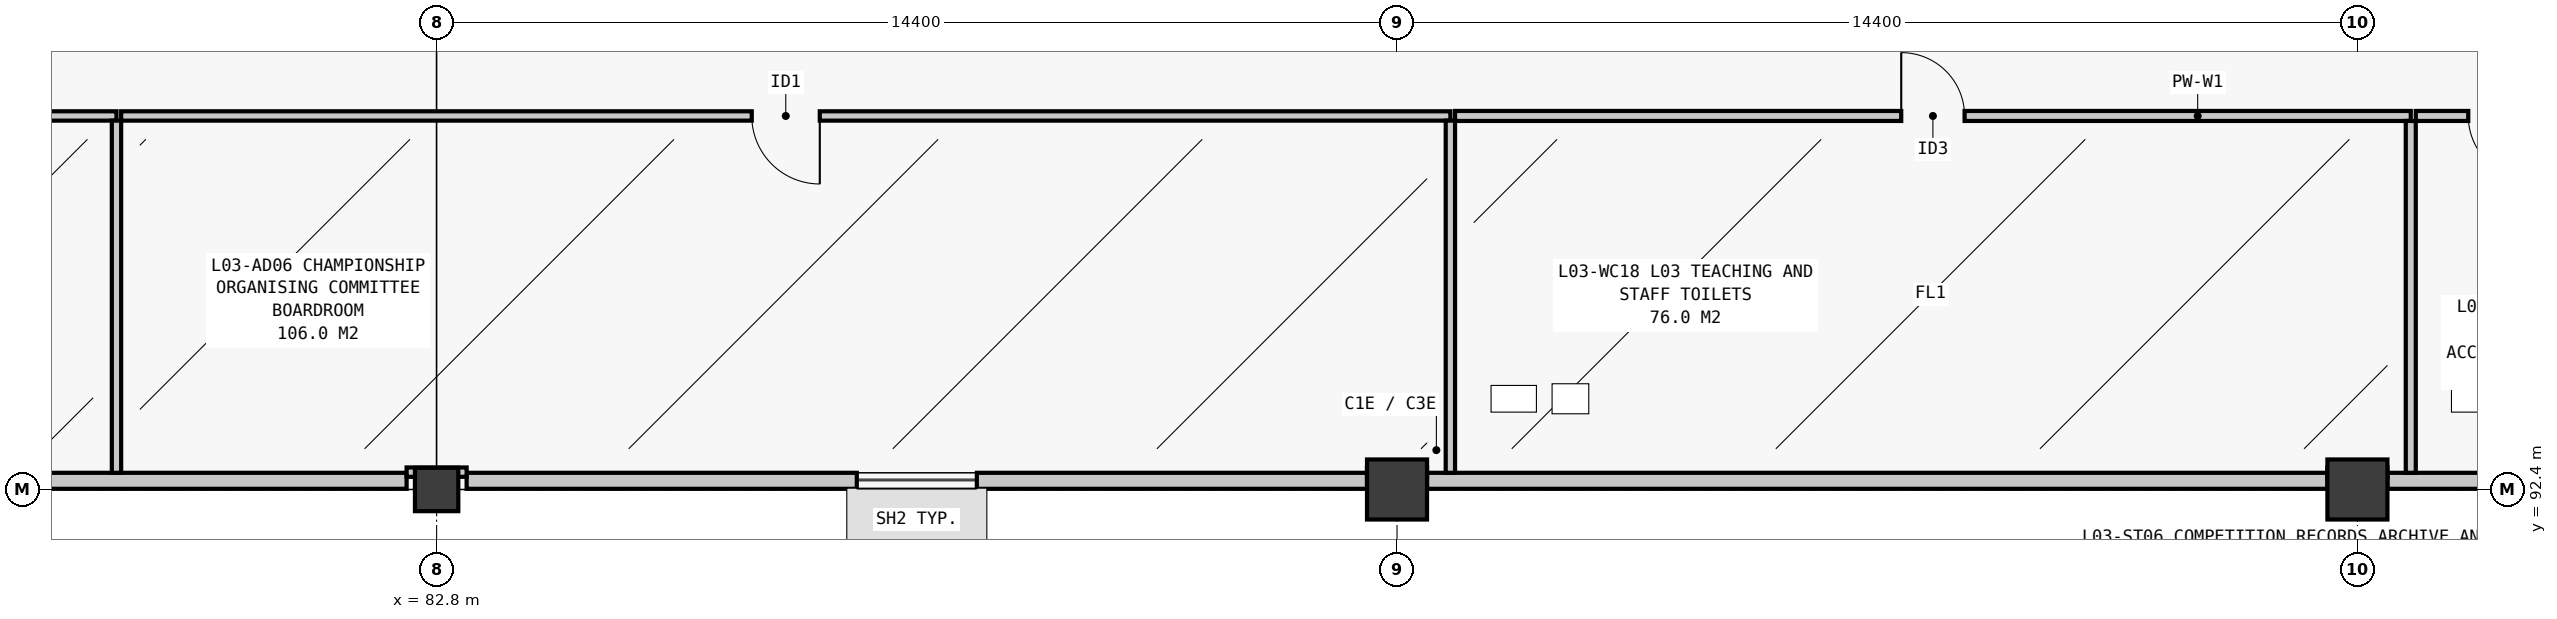
"""IFC4 building model, lengths in metres.
Left out: names, types, materials, properties, quantities, classifications, styles, units other than length and angle.
Written with IfcOpenShell. Run it as: python <this file> out.ifc"""

import sys

from ifc_helpers import new_model, si_unit, direction, frame, frame_2d, origin, origin_2d, place, context, subcontext, project, spatial, rectangle, extrude, element, fill, save


model = new_model("IFC4")
c1 = context("Model", 3, precision=1e-05, world=origin(), true_north=direction((0.0, 1.0)))
c2 = subcontext(c1, "Body", "Model", "MODEL_VIEW")
j1 = project(units=[si_unit("LENGTHUNIT", "METRE"), si_unit("PLANEANGLEUNIT", "RADIAN")], contexts=[c1])
p1 = place(None, origin())
s1 = spatial("IfcSite", under=j1, at=p1, CompositionType="ELEMENT")
p2 = place(p1, origin())
s2 = spatial("IfcBuilding", under=s1, at=p2, CompositionType="ELEMENT")
p3 = place(p2, frame((0.0, 0.0, 13.2)))
s3 = spatial("IfcBuildingStorey", under=s2, at=p3, CompositionType="ELEMENT", Elevation=13.2)
p4 = place(p3, frame((82.8, 92.4, 0.203), z_axis=(0.0, 0.0, 1.0), x_axis=(1.0, 0.0, 0.0)))
e1 = element("IfcColumn", 1, at=p4, inside=s3, PredefinedType="COLUMN", context=c2, shape_type="SweptSolid", body=[
    extrude(rectangle(XDim=0.65, YDim=0.65, at=origin_2d()), origin(), (0.0, 0.0, 1.0), 3.997),
])
p5 = place(p3, frame((97.2, 92.4, 0.0), z_axis=(0.0, 0.0, 1.0), x_axis=(1.0, 0.0, 0.0)))
e2 = element("IfcColumn", 2, at=p5, inside=s3, PredefinedType="COLUMN", context=c2, shape_type="SweptSolid", body=[
    extrude(rectangle(XDim=0.9, YDim=0.9, at=origin_2d()), origin(), (0.0, 0.0, 1.0), 0.994),
])
p6 = place(p3, frame((97.2, 92.4, 0.994), z_axis=(0.0, 0.0, 1.0), x_axis=(1.0, 0.0, 0.0)))
e3 = element("IfcColumn", 3, at=p6, inside=s3, PredefinedType="COLUMN", context=c2, shape_type="SweptSolid", body=[
    extrude(rectangle(XDim=0.65, YDim=0.65, at=origin_2d()), origin(), (0.0, 0.0, 1.0), 3.206),
])
p7 = place(p3, frame((111.6, 92.4, 0.0), z_axis=(0.0, 0.0, 1.0), x_axis=(1.0, 0.0, 0.0)))
e4 = element("IfcColumn", 4, at=p7, inside=s3, PredefinedType="COLUMN", context=c2, shape_type="SweptSolid", body=[
    extrude(rectangle(XDim=0.9, YDim=0.9, at=origin_2d()), origin(), (0.0, 0.0, 1.0), 2.829),
])
p8 = place(p3, frame((111.6, 92.4, 2.829), z_axis=(0.0, 0.0, 1.0), x_axis=(1.0, 0.0, 0.0)))
e5 = element("IfcColumn", 5, at=p8, inside=s3, PredefinedType="COLUMN", context=c2, shape_type="SweptSolid", body=[
    extrude(rectangle(XDim=0.65, YDim=0.65, at=origin_2d()), origin(), (0.0, 0.0, 1.0), 1.371),
])
p9 = place(p3, frame((68.85, 92.53, 0.0), z_axis=(0.0, 0.0, 1.0), x_axis=(1.0, 0.0, 0.0)))
e6 = element("IfcWall", 6, at=p9, inside=s3, PredefinedType="STANDARD", context=c2, shape_type="SweptSolid", body=[
    extrude(rectangle(XDim=13.5, YDim=0.24, at=frame_2d((6.75, 0.0))), origin(), (0.0, 0.0, 1.0), 3.204),
])
p10 = place(p9, frame((5.85, 0.0, 1.35)))
e7 = element("IfcOpeningElement", 7, at=p10, cuts=e6, PredefinedType="OPENING", context=c2, shape_type="SweptSolid", body=[
    extrude(rectangle(XDim=1.8, YDim=1.2, at=frame_2d((0.9, 0.6))), frame((0.0, 0.135, 0.0), z_axis=(0.0, -1.0, 0.0), x_axis=(1.0, 0.0, 0.0)), (0.0, 0.0, 1.0), 0.27),
])
p11 = place(p3, frame((83.25, 92.53, 0.0), z_axis=(0.0, 0.0, 1.0), x_axis=(1.0, 0.0, 0.0)))
e8 = element("IfcWall", 8, at=p11, inside=s3, PredefinedType="STANDARD", context=c2, shape_type="SweptSolid", body=[
    extrude(rectangle(XDim=13.5, YDim=0.24, at=frame_2d((6.75, 0.0))), origin(), (0.0, 0.0, 1.0), 3.204),
])
p12 = place(p11, frame((5.85, 0.0, 1.35)))
e9 = element("IfcOpeningElement", 9, at=p12, cuts=e8, PredefinedType="OPENING", context=c2, shape_type="SweptSolid", body=[
    extrude(rectangle(XDim=1.8, YDim=1.2, at=frame_2d((0.9, 0.6))), frame((0.0, 0.135, 0.0), z_axis=(0.0, -1.0, 0.0), x_axis=(1.0, 0.0, 0.0)), (0.0, 0.0, 1.0), 0.27),
])
p13 = place(p3, frame((97.65, 92.53, 0.0), z_axis=(0.0, 0.0, 1.0), x_axis=(1.0, 0.0, 0.0)))
e10 = element("IfcWall", 10, at=p13, inside=s3, PredefinedType="STANDARD", context=c2, shape_type="SweptSolid", body=[
    extrude(rectangle(XDim=13.5, YDim=0.24, at=frame_2d((6.75, 0.0))), origin(), (0.0, 0.0, 1.0), 3.204),
])
p14 = place(p3, frame((112.05, 92.53, 0.0), z_axis=(0.0, 0.0, 1.0), x_axis=(1.0, 0.0, 0.0)))
e11 = element("IfcWall", 11, at=p14, inside=s3, PredefinedType="STANDARD", context=c2, shape_type="SweptSolid", body=[
    extrude(rectangle(XDim=13.5, YDim=0.24, at=frame_2d((6.75, 0.0))), origin(), (0.0, 0.0, 1.0), 1.79),
])
p15 = place(p3, frame((54.12, 98.0, 0.0), z_axis=(0.0, 0.0, 1.0), x_axis=(1.0, 0.0, 0.0)))
e12 = element("IfcWall", 12, at=p15, inside=s3, PredefinedType="PARTITIONING", context=c2, shape_type="SweptSolid", body=[
    extrude(rectangle(XDim=23.88, YDim=0.14, at=frame_2d((11.94, 0.0))), origin(), (0.0, 0.0, 1.0), 3.97),
])
p16 = place(p15, frame((11.465, 0.0, 0.0)))
e13 = element("IfcOpeningElement", 13, at=p16, cuts=e12, PredefinedType="OPENING", context=c2, shape_type="SweptSolid", body=[
    extrude(rectangle(XDim=0.95, YDim=2.15, at=frame_2d((0.475, 1.075))), frame((0.0, 0.085, 0.0), z_axis=(0.0, -1.0, 0.0), x_axis=(1.0, 0.0, 0.0)), (0.0, 0.0, 1.0), 0.17),
])
p17 = place(p3, frame((78.0, 92.65, 0.0), z_axis=(0.0, 0.0, 1.0), x_axis=(0.0, 1.0, 0.0)))
e14 = element("IfcWall", 14, at=p17, inside=s3, PredefinedType="PARTITIONING", context=c2, shape_type="SweptSolid", body=[
    extrude(rectangle(XDim=5.28, YDim=0.14, at=frame_2d((2.64, 0.0))), origin(), (0.0, 0.0, 1.0), 3.97),
])
p18 = place(p3, frame((78.07, 98.0, 0.0), z_axis=(0.0, 0.0, 1.0), x_axis=(1.0, 0.0, 0.0)))
e15 = element("IfcWall", 15, at=p18, inside=s3, PredefinedType="PARTITIONING", context=c2, shape_type="SweptSolid", body=[
    extrude(rectangle(XDim=19.93, YDim=0.14, at=frame_2d((9.965, 0.0))), origin(), (0.0, 0.0, 1.0), 3.97),
])
p19 = place(p18, frame((9.455, 0.0, 0.0)))
e16 = element("IfcOpeningElement", 16, at=p19, cuts=e15, PredefinedType="OPENING", context=c2, shape_type="SweptSolid", body=[
    extrude(rectangle(XDim=1.02, YDim=2.15, at=frame_2d((0.51, 1.075))), frame((0.0, 0.085, 0.0), z_axis=(0.0, -1.0, 0.0), x_axis=(1.0, 0.0, 0.0)), (0.0, 0.0, 1.0), 0.17),
])
for number, where, z_axis, x_axis in (
    (17, (82.35, 92.66, 0.0), (0.0, 0.0, 1.0), (1.0, 0.0, 0.0)),
    (18, (96.75, 92.66, 0.0), (0.0, 0.0, 1.0), (1.0, 0.0, 0.0)),
):
    element("IfcWall", number, at=place(p3, frame(where, z_axis=z_axis, x_axis=x_axis)), inside=s3, PredefinedType="PARTITIONING", context=c2, shape_type="SweptSolid", body=[
        extrude(rectangle(XDim=0.9, YDim=0.14, at=frame_2d((0.45, 0.0))), origin(), (0.0, 0.0, 1.0), 3.97),
    ])
p20 = place(p3, frame((98.0, 92.65, 0.0), z_axis=(0.0, 0.0, 1.0), x_axis=(0.0, 1.0, 0.0)))
e19 = element("IfcWall", 19, at=p20, inside=s3, PredefinedType="PARTITIONING", context=c2, shape_type="SweptSolid", body=[
    extrude(rectangle(XDim=5.28, YDim=0.14, at=frame_2d((2.64, 0.0))), origin(), (0.0, 0.0, 1.0), 3.97),
])
p21 = place(p3, frame((98.07, 98.0, 0.0), z_axis=(0.0, 0.0, 1.0), x_axis=(1.0, 0.0, 0.0)))
e20 = element("IfcWall", 20, at=p21, inside=s3, PredefinedType="PLUMBINGWALL", context=c2, shape_type="SweptSolid", body=[
    extrude(rectangle(XDim=14.33, YDim=0.15, at=frame_2d((7.165, 0.0))), origin(), (0.0, 0.0, 1.0), 3.97),
])
p22 = place(p21, frame((6.69, 0.0, 0.0)))
e21 = element("IfcOpeningElement", 21, at=p22, cuts=e20, PredefinedType="OPENING", context=c2, shape_type="SweptSolid", body=[
    extrude(rectangle(XDim=0.95, YDim=2.1, at=frame_2d((0.475, 1.05))), frame((0.0, 0.09, 0.0), z_axis=(0.0, -1.0, 0.0), x_axis=(1.0, 0.0, 0.0)), (0.0, 0.0, 1.0), 0.18),
])
p23 = place(p3, frame((111.15, 92.66, 0.0), z_axis=(0.0, 0.0, 1.0), x_axis=(1.0, 0.0, 0.0)))
e22 = element("IfcWall", 22, at=p23, inside=s3, PredefinedType="PLUMBINGWALL", context=c2, shape_type="SweptSolid", body=[
    extrude(rectangle(XDim=0.9, YDim=0.15, at=frame_2d((0.45, 0.0))), origin(), (0.0, 0.0, 1.0), 3.97),
])
p24 = place(p3, frame((112.4, 92.65, 0.0), z_axis=(0.0, 0.0, 1.0), x_axis=(0.0, 1.0, 0.0)))
e23 = element("IfcWall", 23, at=p24, inside=s3, PredefinedType="PLUMBINGWALL", context=c2, shape_type="SweptSolid", body=[
    extrude(rectangle(XDim=5.275, YDim=0.15, at=frame_2d((2.638, 0.0))), origin(), (0.0, 0.0, 1.0), 3.97),
])
p25 = place(p3, frame((112.475, 98.0, 0.0), z_axis=(0.0, 0.0, 1.0), x_axis=(1.0, 0.0, 0.0)))
e24 = element("IfcWall", 24, at=p25, inside=s3, PredefinedType="PLUMBINGWALL", context=c2, shape_type="SweptSolid", body=[
    extrude(rectangle(XDim=2.525, YDim=0.15, at=frame_2d((1.262, 0.0))), origin(), (0.0, 0.0, 1.0), 3.97),
])
p26 = place(p25, frame((0.787, 0.0, 0.0)))
e25 = element("IfcOpeningElement", 25, at=p26, cuts=e24, PredefinedType="OPENING", context=c2, shape_type="SweptSolid", body=[
    extrude(rectangle(XDim=0.95, YDim=2.1, at=frame_2d((0.475, 1.05))), frame((0.0, 0.09, 0.0), z_axis=(0.0, -1.0, 0.0), x_axis=(1.0, 0.0, 0.0)), (0.0, 0.0, 1.0), 0.18),
])
p27 = place(p12, origin())
e26 = element("IfcWindow", 26, at=p27, inside=s3, PartitioningType="SINGLE_PANEL", PredefinedType="WINDOW", context=c2, shape_type="SweptSolid", body=[
    extrude(rectangle(XDim=1.8, YDim=1.2, at=frame_2d((0.9, 0.6))), frame((0.0, 0.03, 0.0), z_axis=(0.0, -1.0, 0.0), x_axis=(1.0, 0.0, 0.0)), (0.0, 0.0, 1.0), 0.06),
])
fill(e9, e26)
p28 = place(p19, frame((1.02, 0.0, 0.0), z_axis=(0.0, 0.0, 1.0), x_axis=(-1.0, 0.0, 0.0)))
e27 = element("IfcDoor", 27, at=p28, inside=s3, OperationType="SINGLE_SWING_RIGHT", PredefinedType="DOOR", context=c2, shape_type="SweptSolid", body=[
    extrude(rectangle(XDim=1.02, YDim=2.15, at=frame_2d((0.51, 1.075))), frame((0.0, 0.025, 0.0), z_axis=(0.0, -1.0, 0.0), x_axis=(1.0, 0.0, 0.0)), (0.0, 0.0, 1.0), 0.05),
])
fill(e16, e27)
p29 = place(p22, origin())
e28 = element("IfcDoor", 28, at=p29, inside=s3, OperationType="SINGLE_SWING_LEFT", PredefinedType="DOOR", context=c2, shape_type="SweptSolid", body=[
    extrude(rectangle(XDim=0.95, YDim=2.1, at=frame_2d((0.475, 1.05))), frame((0.0, 0.025, 0.0), z_axis=(0.0, -1.0, 0.0), x_axis=(1.0, 0.0, 0.0)), (0.0, 0.0, 1.0), 0.05),
])
fill(e21, e28)
p30 = place(p26, frame((0.95, 0.0, 0.0), z_axis=(0.0, 0.0, 1.0), x_axis=(-1.0, 0.0, 0.0)))
e29 = element("IfcDoor", 29, at=p30, inside=s3, OperationType="SINGLE_SWING_RIGHT", PredefinedType="DOOR", context=c2, shape_type="SweptSolid", body=[
    extrude(rectangle(XDim=0.95, YDim=2.1, at=frame_2d((0.475, 1.05))), frame((0.0, 0.025, 0.0), z_axis=(0.0, -1.0, 0.0), x_axis=(1.0, 0.0, 0.0)), (0.0, 0.0, 1.0), 0.05),
])
fill(e25, e29)
save(model, sys.argv[1])
